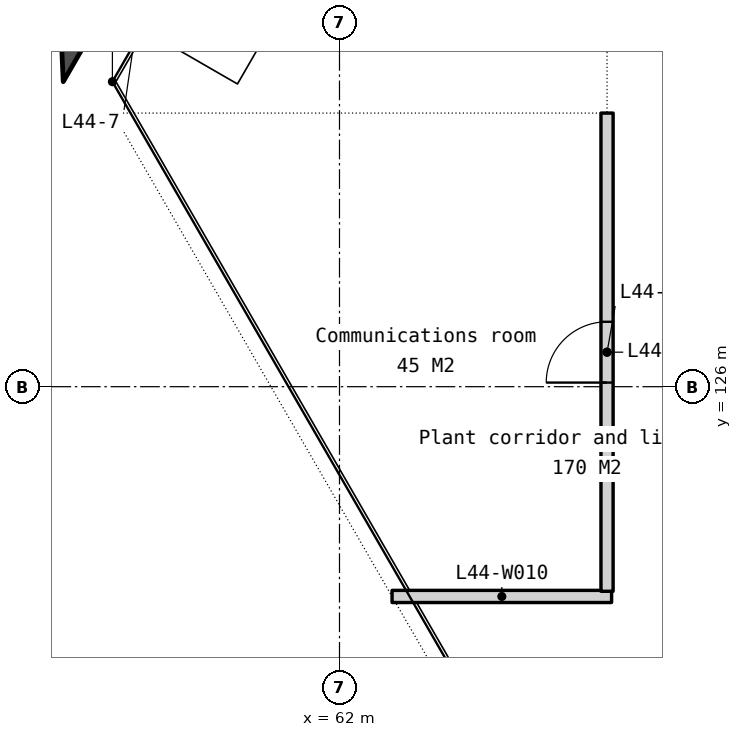
"""IFC4 building model, lengths in metres.
Left out: names, types, materials, properties, quantities, classifications, styles, units other than length and angle.
Written with IfcOpenShell. Run it as: python <this file> out.ifc"""

import sys

from ifc_helpers import new_model, si_unit, direction, frame, frame_2d, origin, place, context, subcontext, project, spatial, polyline, rectangle, outline, extrude, element, fill, save


model = new_model("IFC4")
c1 = context("Model", 3, precision=1e-05, world=origin(), true_north=direction((0.0, 1.0)))
c2 = subcontext(c1, "Body", "Model", "MODEL_VIEW")
j1 = project(units=[si_unit("LENGTHUNIT", "METRE"), si_unit("PLANEANGLEUNIT", "RADIAN")], contexts=[c1])
p1 = place(None, origin())
s1 = spatial("IfcSite", under=j1, at=p1, CompositionType="ELEMENT")
p2 = place(p1, origin())
s2 = spatial("IfcBuilding", under=s1, at=p2, CompositionType="ELEMENT")
p3 = place(p2, frame((0.0, 0.0, 175.4)))
s3 = spatial("IfcBuildingStorey", under=s2, at=p3, CompositionType="ELEMENT", Elevation=175.4)
p4 = place(p3, frame((0.0, 0.0, -0.25)))
e1 = element("IfcWall", 1, at=p4, inside=s3, PredefinedType="SOLIDWALL", context=c2, shape_type="SweptSolid", body=[
    extrude(outline(polyline([(59.757, 135.0), (57.319, 134.088), (57.457, 131.016), (59.757, 135.0)])), origin(), (0.0, 0.0, 1.0), 4.6),
])
p5 = place(p3, frame((62.865, 122.55, 0.0), z_axis=(0.0, 0.0, 1.0), x_axis=(1.0, 0.0, 0.0)))
e2 = element("IfcWall", 2, at=p5, inside=s3, PredefinedType="PARTITIONING", context=c2, shape_type="SweptSolid", body=[
    extrude(rectangle(XDim=3.611, YDim=0.2, at=frame_2d((1.805, 0.0))), origin(), (0.0, 0.0, 1.0), 4.35),
])
p6 = place(p3, frame((66.4, 122.635, 0.0), z_axis=(0.0, 0.0, 1.0), x_axis=(0.0, 1.0, 0.0)))
e3 = element("IfcWall", 3, at=p6, inside=s3, PredefinedType="PARTITIONING", context=c2, shape_type="SweptSolid", body=[
    extrude(rectangle(XDim=7.865, YDim=0.2, at=frame_2d((3.933, 0.0))), origin(), (0.0, 0.0, 1.0), 4.35),
])
p7 = place(p6, frame((3.433, 0.0, 0.0)))
e4 = element("IfcOpeningElement", 4, at=p7, cuts=e3, PredefinedType="OPENING", context=c2, shape_type="SweptSolid", body=[
    extrude(rectangle(XDim=1.0, YDim=2.1, at=frame_2d((0.5, 1.05))), frame((0.0, 0.11, 0.0), z_axis=(0.0, -1.0, 0.0), x_axis=(1.0, 0.0, 0.0)), (0.0, 0.0, 1.0), 0.22),
])
p8 = place(p7, origin())
e5 = element("IfcDoor", 5, at=p8, inside=s3, OperationType="SINGLE_SWING_LEFT", PredefinedType="DOOR", context=c2, shape_type="SweptSolid", body=[
    extrude(rectangle(XDim=1.0, YDim=2.1, at=frame_2d((0.5, 1.05))), frame((0.0, 0.025, 0.0), z_axis=(0.0, -1.0, 0.0), x_axis=(1.0, 0.0, 0.0)), (0.0, 0.0, 1.0), 0.05),
])
fill(e4, e5)
save(model, sys.argv[1])
